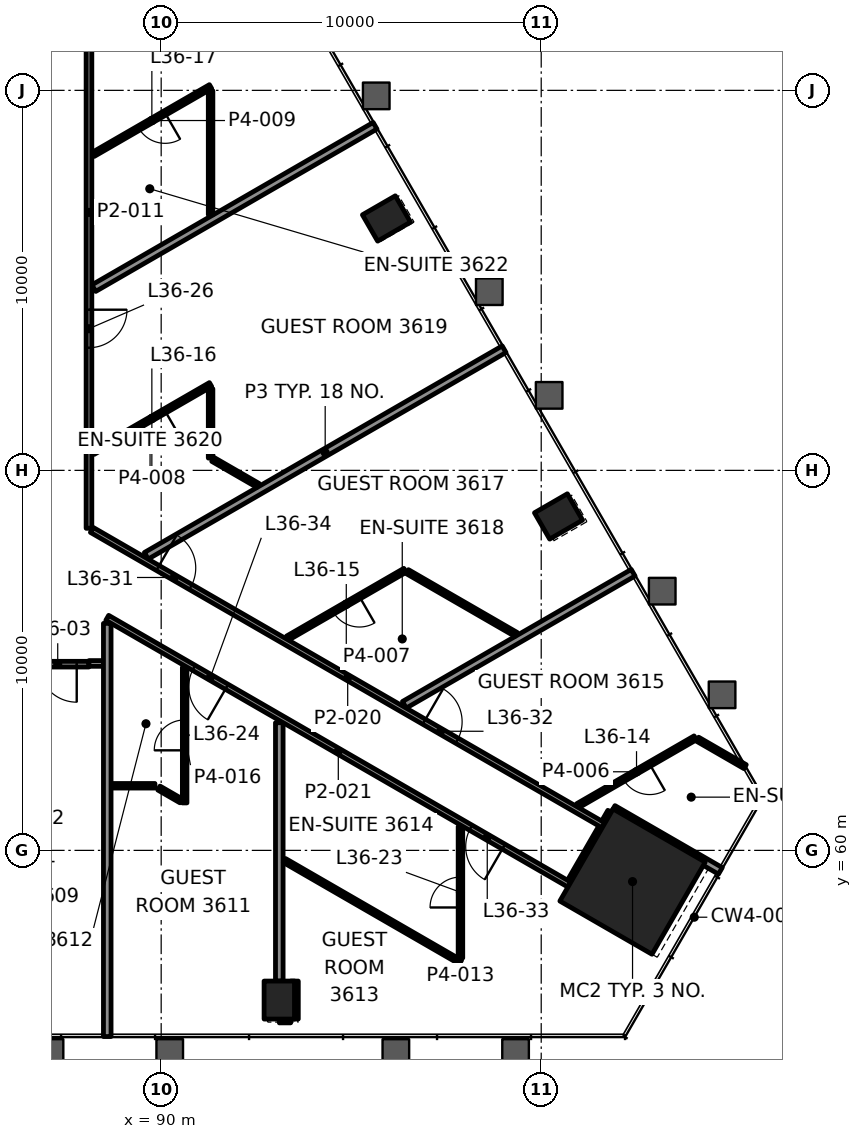
"""IFC4 building model, lengths in metres.
Left out: names, types, materials, properties, quantities, classifications, styles, units other than length and angle.
Written with IfcOpenShell. Run it as: python <this file> out.ifc"""

import sys

from ifc_helpers import new_model, si_unit, direction, frame, frame_2d, origin, origin_2d, place, context, subcontext, project, spatial, rectangle, hollow_rectangle, extrude, element, fill, save


model = new_model("IFC4")
c1 = context("Model", 3, precision=1e-05, world=origin(), true_north=direction((0.0, 1.0)))
c2 = subcontext(c1, "Body", "Model", "MODEL_VIEW")
j1 = project(units=[si_unit("LENGTHUNIT", "METRE"), si_unit("PLANEANGLEUNIT", "RADIAN")], contexts=[c1])
p1 = place(None, origin())
s1 = spatial("IfcSite", under=j1, at=p1, CompositionType="ELEMENT")
p2 = place(p1, origin())
s2 = spatial("IfcBuilding", under=s1, at=p2, CompositionType="ELEMENT")
p3 = place(p2, frame((0.0, 0.0, 159.7)))
s3 = spatial("IfcBuildingStorey", under=s2, at=p3, CompositionType="ELEMENT", Elevation=159.7)
p4 = place(p3, frame((102.403, 59.179, 0.0), z_axis=(0.0, 0.0, 1.0), x_axis=(0.5, 0.866025403784, 0.0)))
e1 = element("IfcColumn", 1, at=p4, inside=s3, PredefinedType="COLUMN", context=c2, shape_type="SweptSolid", body=[
    extrude(rectangle(XDim=2.8, YDim=2.8, at=origin_2d()), origin(), (0.0, 0.0, 1.0), 3.9),
])
for number, where, z_axis, x_axis in (
    (2, (93.108, 56.061, -0.0), (0.0, 0.0, 1.0), (1.0, 0.0, 0.0)),
    (3, (100.456, 68.788, -0.0), (0.0, 0.0, 1.0), (-0.5, 0.866, 0.0)),
    (4, (95.928, 76.628, -0.0), (0.0, 0.0, 1.0), (-0.5, 0.866, 0.0)),
):
    element("IfcColumn", number, at=place(p3, frame(where, z_axis=z_axis, x_axis=x_axis)), inside=s3, PredefinedType="COLUMN", context=c2, shape_type="SweptSolid", body=[
        extrude(hollow_rectangle(XDim=0.8, YDim=1.0, WallThickness=0.05, at=origin_2d()), origin(), (0.0, 0.0, 1.0), 3.9),
    ])
p5 = place(p3, frame((93.108, 55.561, 0.0), z_axis=(0.0, 0.0, 1.0), x_axis=(1.0, 0.0, 0.0)))
e5 = element("IfcWall", 5, at=p5, inside=s3, PredefinedType="PARTITIONING", context=c2, shape_type="SweptSolid", body=[
    extrude(rectangle(XDim=0.3, YDim=0.2, at=frame_2d((0.15, 0.0))), origin(), (0.0, 0.0, 1.0), 3.1),
])
p6 = place(p3, frame((88.691, 61.7, 0.0), z_axis=(0.0, 0.0, 1.0), x_axis=(1.0, 0.0, 0.0)))
e6 = element("IfcWall", 6, at=p6, inside=s3, PredefinedType="PARTITIONING", context=c2, shape_type="SweptSolid", body=[
    extrude(rectangle(XDim=1.145, YDim=0.12, at=frame_2d((0.573, 0.0))), origin(), (0.0, 0.0, 1.0), 3.1),
])
p7 = place(p3, frame((88.1, 64.9, 0.0), z_axis=(0.0, 0.0, 1.0), x_axis=(-1.0, 0.0, 0.0)))
e7 = element("IfcWall", 7, at=p7, inside=s3, PredefinedType="PARTITIONING", context=c2, shape_type="SweptSolid", body=[
    extrude(rectangle(XDim=26.199, YDim=0.15, at=frame_2d((13.1, 0.0))), origin(), (0.0, 0.0, 1.0), 3.1),
])
p8 = place(p7, frame((0.322, 0.0, 0.0)))
e8 = element("IfcOpeningElement", 8, at=p8, cuts=e7, PredefinedType="OPENING", context=c2, shape_type="SweptSolid", body=[
    extrude(rectangle(XDim=1.0, YDim=2.1, at=frame_2d((0.5, 1.05))), frame((0.0, 0.085, 0.0), z_axis=(0.0, -1.0, 0.0), x_axis=(1.0, 0.0, 0.0)), (0.0, 0.0, 1.0), 0.17),
])
p9 = place(p7, frame((5.859, 0.0, 0.0)))
e9 = element("IfcOpeningElement", 9, at=p9, cuts=e7, PredefinedType="OPENING", context=c2, shape_type="SweptSolid", body=[
    extrude(rectangle(XDim=0.9, YDim=2.1, at=frame_2d((0.45, 1.05))), frame((0.0, 0.085, 0.0), z_axis=(0.0, -1.0, 0.0), x_axis=(1.0, 0.0, 0.0)), (0.0, 0.0, 1.0), 0.17),
])
p10 = place(p7, frame((8.981, 0.0, 0.0)))
e10 = element("IfcOpeningElement", 10, at=p10, cuts=e7, PredefinedType="OPENING", context=c2, shape_type="SweptSolid", body=[
    extrude(rectangle(XDim=1.0, YDim=2.1, at=frame_2d((0.5, 1.05))), frame((0.0, 0.085, 0.0), z_axis=(0.0, -1.0, 0.0), x_axis=(1.0, 0.0, 0.0)), (0.0, 0.0, 1.0), 0.17),
])
p11 = place(p7, frame((16.611, 0.0, 0.0)))
e11 = element("IfcOpeningElement", 11, at=p11, cuts=e7, PredefinedType="OPENING", context=c2, shape_type="SweptSolid", body=[
    extrude(rectangle(XDim=0.9, YDim=2.1, at=frame_2d((0.45, 1.05))), frame((0.0, 0.085, 0.0), z_axis=(0.0, -1.0, 0.0), x_axis=(1.0, 0.0, 0.0)), (0.0, 0.0, 1.0), 0.17),
])
p12 = place(p7, frame((20.006, 0.0, 0.0)))
e12 = element("IfcOpeningElement", 12, at=p12, cuts=e7, PredefinedType="OPENING", context=c2, shape_type="SweptSolid", body=[
    extrude(rectangle(XDim=0.9, YDim=2.1, at=frame_2d((0.45, 1.05))), frame((0.0, 0.085, 0.0), z_axis=(0.0, -1.0, 0.0), x_axis=(1.0, 0.0, 0.0)), (0.0, 0.0, 1.0), 0.17),
])
p13 = place(p7, frame((23.575, 0.0, 0.0)))
e13 = element("IfcOpeningElement", 13, at=p13, cuts=e7, PredefinedType="OPENING", context=c2, shape_type="SweptSolid", body=[
    extrude(rectangle(XDim=1.0, YDim=2.1, at=frame_2d((0.5, 1.05))), frame((0.0, 0.085, 0.0), z_axis=(0.0, -1.0, 0.0), x_axis=(1.0, 0.0, 0.0)), (0.0, 0.0, 1.0), 0.17),
])
p14 = place(p3, frame((88.1, 64.919, 0.0), z_axis=(0.0, 0.0, 1.0), x_axis=(1.0, 0.0, 0.0)))
e14 = element("IfcWall", 14, at=p14, inside=s3, PredefinedType="PARTITIONING", context=c2, shape_type="SweptSolid", body=[
    extrude(rectangle(XDim=0.381, YDim=0.15, at=frame_2d((0.19, 0.0))), origin(), (0.0, 0.0, 1.0), 3.1),
])
p15 = place(p3, frame((104.053, 62.961, 0.0), z_axis=(0.0, 0.0, 1.0), x_axis=(-0.866045460162, -0.499965259726, 0.0)))
e15 = element("IfcWall", 15, at=p15, inside=s3, PredefinedType="PARTITIONING", context=c2, shape_type="SweptSolid", body=[
    extrude(rectangle(XDim=3.569, YDim=0.12, at=frame_2d((1.784, 0.0))), origin(), (0.0, 0.0, 1.0), 3.1),
])
p16 = place(p15, frame((1.384, 0.0, 0.0)))
e16 = element("IfcOpeningElement", 16, at=p16, cuts=e15, PredefinedType="OPENING", context=c2, shape_type="SweptSolid", body=[
    extrude(rectangle(XDim=0.8, YDim=2.1, at=frame_2d((0.4, 1.05))), frame((0.0, 0.07, 0.0), z_axis=(0.0, -1.0, 0.0), x_axis=(1.0, 0.0, 0.0)), (0.0, 0.0, 1.0), 0.14),
])
p17 = place(p3, frame((96.399, 63.831, 0.0), z_axis=(0.0, 0.0, 1.0), x_axis=(0.86602358327, 0.50000315321, 0.0)))
e17 = element("IfcWall", 17, at=p17, inside=s3, PredefinedType="PARTITIONING", context=c2, shape_type="SweptSolid", body=[
    extrude(rectangle(XDim=6.952, YDim=0.2, at=frame_2d((3.476, 0.0))), origin(), (0.0, 0.0, 1.0), 3.1),
])
p18 = place(p3, frame((96.416, 67.37, 0.0), z_axis=(0.0, 0.0, 1.0), x_axis=(-0.866028357664, -0.499994883695, 0.0)))
e18 = element("IfcWall", 18, at=p18, inside=s3, PredefinedType="PARTITIONING", context=c2, shape_type="SweptSolid", body=[
    extrude(rectangle(XDim=3.568, YDim=0.12, at=frame_2d((1.784, 0.0))), origin(), (0.0, 0.0, 1.0), 3.1),
])
p19 = place(p18, frame((1.384, 0.0, 0.0)))
e19 = element("IfcOpeningElement", 19, at=p19, cuts=e18, PredefinedType="OPENING", context=c2, shape_type="SweptSolid", body=[
    extrude(rectangle(XDim=0.8, YDim=2.1, at=frame_2d((0.4, 1.05))), frame((0.0, 0.07, 0.0), z_axis=(0.0, -1.0, 0.0), x_axis=(1.0, 0.0, 0.0)), (0.0, 0.0, 1.0), 0.14),
])
p20 = place(p3, frame((89.608, 67.752, 0.0), z_axis=(0.0, 0.0, 1.0), x_axis=(0.86602628359, 0.499998476129, 0.0)))
e20 = element("IfcWall", 20, at=p20, inside=s3, PredefinedType="PARTITIONING", context=c2, shape_type="SweptSolid", body=[
    extrude(rectangle(XDim=10.872, YDim=0.2, at=frame_2d((5.436, 0.0))), origin(), (0.0, 0.0, 1.0), 2.865),
])
p21 = place(p3, frame((91.3, 72.258, 0.0), z_axis=(0.0, 0.0, 1.0), x_axis=(-0.866028357664, -0.499994883695, 0.0)))
e21 = element("IfcWall", 21, at=p21, inside=s3, PredefinedType="PARTITIONING", context=c2, shape_type="SweptSolid", body=[
    extrude(rectangle(XDim=3.568, YDim=0.12, at=frame_2d((1.784, 0.0))), origin(), (0.0, 0.0, 1.0), 3.1),
])
p22 = place(p21, frame((1.384, 0.0, 0.0)))
e22 = element("IfcOpeningElement", 22, at=p22, cuts=e21, PredefinedType="OPENING", context=c2, shape_type="SweptSolid", body=[
    extrude(rectangle(XDim=0.8, YDim=2.1, at=frame_2d((0.4, 1.05))), frame((0.0, 0.07, 0.0), z_axis=(0.0, -1.0, 0.0), x_axis=(1.0, 0.0, 0.0)), (0.0, 0.0, 1.0), 0.14),
])
p23 = place(p3, frame((88.227, 74.795, 0.0), z_axis=(0.0, 0.0, 1.0), x_axis=(0.866017652766, 0.500013424917, 0.0)))
e23 = element("IfcWall", 23, at=p23, inside=s3, PredefinedType="PARTITIONING", context=c2, shape_type="SweptSolid", body=[
    extrude(rectangle(XDim=8.546, YDim=0.2, at=frame_2d((4.273, 0.0))), origin(), (0.0, 0.0, 1.0), 2.865),
])
p24 = place(p3, frame((91.3, 80.098, 0.0), z_axis=(0.0, 0.0, 1.0), x_axis=(-0.866028357664, -0.499994883695, 0.0)))
e24 = element("IfcWall", 24, at=p24, inside=s3, PredefinedType="PARTITIONING", context=c2, shape_type="SweptSolid", body=[
    extrude(rectangle(XDim=3.568, YDim=0.12, at=frame_2d((1.784, 0.0))), origin(), (0.0, 0.0, 1.0), 3.1),
])
p25 = place(p24, frame((1.384, 0.0, 0.0)))
e25 = element("IfcOpeningElement", 25, at=p25, cuts=e24, PredefinedType="OPENING", context=c2, shape_type="SweptSolid", body=[
    extrude(rectangle(XDim=0.8, YDim=2.1, at=frame_2d((0.4, 1.05))), frame((0.0, 0.07, 0.0), z_axis=(0.0, -1.0, 0.0), x_axis=(1.0, 0.0, 0.0)), (0.0, 0.0, 1.0), 0.14),
])
p26 = place(p3, frame((100.778, 59.165, 0.0), z_axis=(0.0, 0.0, 1.0), x_axis=(0.500102515474, 0.865966208357, 0.0)))
e26 = element("IfcWall", 26, at=p26, inside=s3, PredefinedType="PARTITIONING", context=c2, shape_type="SweptSolid", body=[
    extrude(rectangle(XDim=1.65, YDim=0.2, at=frame_2d((0.825, 0.0))), origin(), (0.0, 0.0, 1.0), 2.947),
])
p27 = place(p3, frame((97.875, 57.168, 0.0), z_axis=(0.0, 0.0, 1.0), x_axis=(0.0, 1.0, 0.0)))
e27 = element("IfcWall", 27, at=p27, inside=s3, PredefinedType="PARTITIONING", context=c2, shape_type="SweptSolid", body=[
    extrude(rectangle(XDim=3.459, YDim=0.12, at=frame_2d((1.729, 0.0))), origin(), (0.0, 0.0, 1.0), 3.1),
])
p28 = place(p27, frame((1.33, 0.0, 0.0)))
e28 = element("IfcOpeningElement", 28, at=p28, cuts=e27, PredefinedType="OPENING", context=c2, shape_type="SweptSolid", body=[
    extrude(rectangle(XDim=0.8, YDim=2.1, at=frame_2d((0.4, 1.05))), frame((0.0, 0.07, 0.0), z_axis=(0.0, -1.0, 0.0), x_axis=(1.0, 0.0, 0.0)), (0.0, 0.0, 1.0), 0.14),
])
p29 = place(p3, frame((93.508, 55.562, 0.0), z_axis=(0.0, 0.0, 1.0), x_axis=(0.0, 1.0, 0.0)))
e29 = element("IfcWall", 29, at=p29, inside=s3, PredefinedType="PARTITIONING", context=c2, shape_type="SweptSolid", body=[
    extrude(rectangle(XDim=0.999, YDim=0.2, at=frame_2d((0.5, 0.0))), origin(), (0.0, 0.0, 1.0), 3.1),
])
p30 = place(p3, frame((93.108, 56.561, 0.0), z_axis=(0.0, 0.0, 1.0), x_axis=(0.0, 1.0, 0.0)))
e30 = element("IfcWall", 30, at=p30, inside=s3, PredefinedType="PARTITIONING", context=c2, shape_type="SweptSolid", body=[
    extrude(rectangle(XDim=6.799, YDim=0.2, at=frame_2d((3.399, 0.0))), origin(), (0.0, 0.0, 1.0), 3.1),
])
p31 = place(p3, frame((91.3, 70.323, 0.0), z_axis=(0.0, 0.0, 1.0), x_axis=(0.0, 1.0, 0.0)))
e31 = element("IfcWall", 31, at=p31, inside=s3, PredefinedType="PARTITIONING", context=c2, shape_type="SweptSolid", body=[
    extrude(rectangle(XDim=1.824, YDim=0.12, at=frame_2d((0.912, 0.0))), origin(), (0.0, 0.0, 1.0), 3.1),
])
p32 = place(p3, frame((91.3, 76.725, 0.0), z_axis=(0.0, 0.0, 1.0), x_axis=(0.0, 1.0, 0.0)))
e32 = element("IfcWall", 32, at=p32, inside=s3, PredefinedType="PARTITIONING", context=c2, shape_type="SweptSolid", body=[
    extrude(rectangle(XDim=3.264, YDim=0.12, at=frame_2d((1.632, 0.0))), origin(), (0.0, 0.0, 1.0), 3.1),
])
p33 = place(p3, frame((90.618, 61.249, 0.0), z_axis=(0.0, 0.0, 1.0), x_axis=(0.0, 1.0, 0.0)))
e33 = element("IfcWall", 33, at=p33, inside=s3, PredefinedType="PARTITIONING", context=c2, shape_type="SweptSolid", body=[
    extrude(rectangle(XDim=3.569, YDim=0.12, at=frame_2d((1.784, 0.0))), origin(), (0.0, 0.0, 1.0), 2.947),
])
p34 = place(p33, frame((1.384, 0.0, 0.0)))
e34 = element("IfcOpeningElement", 34, at=p34, cuts=e33, PredefinedType="OPENING", context=c2, shape_type="SweptSolid", body=[
    extrude(rectangle(XDim=0.8, YDim=2.1, at=frame_2d((0.4, 1.05))), frame((0.0, 0.07, 0.0), z_axis=(0.0, -1.0, 0.0), x_axis=(1.0, 0.0, 0.0)), (0.0, 0.0, 1.0), 0.14),
])
p35 = place(p3, frame((88.581, 55.101, 0.0), z_axis=(0.0, 0.0, 1.0), x_axis=(0.0, 1.0, 0.0)))
e35 = element("IfcWall", 35, at=p35, inside=s3, PredefinedType="PARTITIONING", context=c2, shape_type="SweptSolid", body=[
    extrude(rectangle(XDim=10.872, YDim=0.2, at=frame_2d((5.436, 0.0))), origin(), (0.0, 0.0, 1.0), 2.865),
])
p36 = place(p3, frame((88.1, 85.1, 0.0), z_axis=(0.0, 0.0, 1.0), x_axis=(0.0, -1.0, 0.0)))
e36 = element("IfcWall", 36, at=p36, inside=s3, PredefinedType="PARTITIONING", context=c2, shape_type="SweptSolid", body=[
    extrude(rectangle(XDim=16.624, YDim=0.15, at=frame_2d((8.312, 0.0))), origin(), (0.0, 0.0, 1.0), 3.1),
])
p37 = place(p36, frame((3.031, 0.0, 0.0)))
e37 = element("IfcOpeningElement", 37, at=p37, cuts=e36, PredefinedType="OPENING", context=c2, shape_type="SweptSolid", body=[
    extrude(rectangle(XDim=1.0, YDim=2.1, at=frame_2d((0.5, 1.05))), frame((0.0, 0.085, 0.0), z_axis=(0.0, -1.0, 0.0), x_axis=(1.0, 0.0, 0.0)), (0.0, 0.0, 1.0), 0.17),
])
p38 = place(p36, frame((10.872, 0.0, 0.0)))
e38 = element("IfcOpeningElement", 38, at=p38, cuts=e36, PredefinedType="OPENING", context=c2, shape_type="SweptSolid", body=[
    extrude(rectangle(XDim=1.0, YDim=2.1, at=frame_2d((0.5, 1.05))), frame((0.0, 0.085, 0.0), z_axis=(0.0, -1.0, 0.0), x_axis=(1.0, 0.0, 0.0)), (0.0, 0.0, 1.0), 0.17),
])
p39 = place(p3, frame((105.366, 62.203, 0.0), z_axis=(0.0, 0.0, 1.0), x_axis=(-0.866011286779, 0.500024450573, 0.0)))
e39 = element("IfcWall", 39, at=p39, inside=s3, PredefinedType="PARTITIONING", context=c2, shape_type="SweptSolid", body=[
    extrude(rectangle(XDim=1.446, YDim=0.12, at=frame_2d((0.723, 0.0))), origin(), (0.0, 0.0, 1.0), 3.1),
])
p40 = place(p3, frame((99.337, 65.684, 0.0), z_axis=(0.0, 0.0, 1.0), x_axis=(-0.866024373554, 0.500001784407, 0.0)))
e40 = element("IfcWall", 40, at=p40, inside=s3, PredefinedType="PARTITIONING", context=c2, shape_type="SweptSolid", body=[
    extrude(rectangle(XDim=3.304, YDim=0.12, at=frame_2d((1.652, 0.0))), origin(), (0.0, 0.0, 1.0), 3.1),
])
p41 = place(p3, frame((92.546, 69.604, 0.0), z_axis=(0.0, 0.0, 1.0), x_axis=(-0.866052025982, 0.499953886166, 0.0)))
e41 = element("IfcWall", 41, at=p41, inside=s3, PredefinedType="PARTITIONING", context=c2, shape_type="SweptSolid", body=[
    extrude(rectangle(XDim=1.37, YDim=0.12, at=frame_2d((0.685, 0.0))), origin(), (0.0, 0.0, 1.0), 3.1),
])
p42 = place(p3, frame((104.714, 59.461, 0.0), z_axis=(0.0, 0.0, 1.0), x_axis=(-0.866035906198, 0.499981808845, 0.0)))
e42 = element("IfcWall", 42, at=p42, inside=s3, PredefinedType="PARTITIONING", context=c2, shape_type="SweptSolid", body=[
    extrude(rectangle(XDim=3.259, YDim=0.2, at=frame_2d((1.63, 0.0))), origin(), (0.0, 0.0, 1.0), 3.1),
])
p43 = place(p3, frame((88.175, 68.433, 0.0), z_axis=(0.0, 0.0, 1.0), x_axis=(0.866030530892, -0.499991119485, 0.0)))
e43 = element("IfcWall", 43, at=p43, inside=s3, PredefinedType="PARTITIONING", context=c2, shape_type="SweptSolid", body=[
    extrude(rectangle(XDim=15.549, YDim=0.15, at=frame_2d((7.774, 0.0))), origin(), (0.0, 0.0, 1.0), 3.1),
])
p44 = place(p43, frame((2.003, 0.0, 0.0)))
e44 = element("IfcOpeningElement", 44, at=p44, cuts=e43, PredefinedType="OPENING", context=c2, shape_type="SweptSolid", body=[
    extrude(rectangle(XDim=1.0, YDim=2.1, at=frame_2d((0.5, 1.05))), frame((0.0, 0.085, 0.0), z_axis=(0.0, -1.0, 0.0), x_axis=(1.0, 0.0, 0.0)), (0.0, 0.0, 1.0), 0.17),
])
p45 = place(p43, frame((10.096, 0.0, 0.0)))
e45 = element("IfcOpeningElement", 45, at=p45, cuts=e43, PredefinedType="OPENING", context=c2, shape_type="SweptSolid", body=[
    extrude(rectangle(XDim=1.0, YDim=2.1, at=frame_2d((0.5, 1.05))), frame((0.0, 0.085, 0.0), z_axis=(0.0, -1.0, 0.0), x_axis=(1.0, 0.0, 0.0)), (0.0, 0.0, 1.0), 0.17),
])
p46 = place(p3, frame((100.74, 59.1, 0.0), z_axis=(0.0, 0.0, 1.0), x_axis=(-0.866028060244, 0.499995398849, 0.0)))
e46 = element("IfcWall", 46, at=p46, inside=s3, PredefinedType="PARTITIONING", context=c2, shape_type="SweptSolid", body=[
    extrude(rectangle(XDim=14.04, YDim=0.15, at=frame_2d((7.02, 0.0))), origin(), (0.0, 0.0, 1.0), 2.947),
])
p47 = place(p46, frame((1.994, 0.0, 0.0)))
e47 = element("IfcOpeningElement", 47, at=p47, cuts=e46, PredefinedType="OPENING", context=c2, shape_type="SweptSolid", body=[
    extrude(rectangle(XDim=1.0, YDim=2.1, at=frame_2d((0.5, 1.05))), frame((0.0, 0.085, 0.0), z_axis=(0.0, -1.0, 0.0), x_axis=(1.0, 0.0, 0.0)), (0.0, 0.0, 1.0), 0.17),
])
p48 = place(p46, frame((10.409, 0.0, 0.0)))
e48 = element("IfcOpeningElement", 48, at=p48, cuts=e46, PredefinedType="OPENING", context=c2, shape_type="SweptSolid", body=[
    extrude(rectangle(XDim=1.0, YDim=2.1, at=frame_2d((0.5, 1.05))), frame((0.0, 0.085, 0.0), z_axis=(0.0, -1.0, 0.0), x_axis=(1.0, 0.0, 0.0)), (0.0, 0.0, 1.0), 0.17),
])
p49 = place(p3, frame((97.875, 57.059, 0.0), z_axis=(0.0, 0.0, 1.0), x_axis=(-0.866041187555, 0.499972660711, 0.0)))
e49 = element("IfcWall", 49, at=p49, inside=s3, PredefinedType="PARTITIONING", context=c2, shape_type="SweptSolid", body=[
    extrude(rectangle(XDim=5.349, YDim=0.12, at=frame_2d((2.675, 0.0))), origin(), (0.0, 0.0, 1.0), 3.1),
])
p50 = place(p3, frame((90.523, 61.303, 0.0), z_axis=(0.0, 0.0, 1.0), x_axis=(-0.865913915833, 0.500193053097, 0.0)))
e50 = element("IfcWall", 50, at=p50, inside=s3, PredefinedType="PARTITIONING", context=c2, shape_type="SweptSolid", body=[
    extrude(rectangle(XDim=0.674, YDim=0.12, at=frame_2d((0.337, 0.0))), origin(), (0.0, 0.0, 1.0), 3.1),
])
p51 = place(p3, frame((101.678, 60.723, 0.0), z_axis=(0.0, 0.0, 1.0), x_axis=(0.499700736801, 0.866198114545, 0.0)))
e51 = element("IfcWall", 51, at=p51, inside=s3, PredefinedType="PARTITIONING", context=c2, shape_type="SweptSolid", body=[
    extrude(rectangle(XDim=0.324, YDim=0.2, at=frame_2d((0.162, 0.0))), origin(), (0.0, 0.0, 1.0), 3.1),
])
p52 = place(p8, origin())
e52 = element("IfcDoor", 52, at=p52, inside=s3, OperationType="SINGLE_SWING_LEFT", PredefinedType="DOOR", context=c2, shape_type="SweptSolid", body=[
    extrude(rectangle(XDim=1.0, YDim=2.1, at=frame_2d((0.5, 1.05))), frame((0.0, 0.025, 0.0), z_axis=(0.0, -1.0, 0.0), x_axis=(1.0, 0.0, 0.0)), (0.0, 0.0, 1.0), 0.05),
])
fill(e8, e52)
p53 = place(p16, origin())
e53 = element("IfcDoor", 53, at=p53, inside=s3, OperationType="SINGLE_SWING_RIGHT", PredefinedType="DOOR", context=c2, shape_type="SweptSolid", body=[
    extrude(rectangle(XDim=0.8, YDim=2.1, at=frame_2d((0.4, 1.05))), frame((0.0, 0.025, 0.0), z_axis=(0.0, -1.0, 0.0), x_axis=(1.0, 0.0, 0.0)), (0.0, 0.0, 1.0), 0.05),
])
fill(e16, e53)
p54 = place(p19, origin())
e54 = element("IfcDoor", 54, at=p54, inside=s3, OperationType="SINGLE_SWING_RIGHT", PredefinedType="DOOR", context=c2, shape_type="SweptSolid", body=[
    extrude(rectangle(XDim=0.8, YDim=2.1, at=frame_2d((0.4, 1.05))), frame((0.0, 0.025, 0.0), z_axis=(0.0, -1.0, 0.0), x_axis=(1.0, 0.0, 0.0)), (0.0, 0.0, 1.0), 0.05),
])
fill(e19, e54)
p55 = place(p22, origin())
e55 = element("IfcDoor", 55, at=p55, inside=s3, OperationType="SINGLE_SWING_RIGHT", PredefinedType="DOOR", context=c2, shape_type="SweptSolid", body=[
    extrude(rectangle(XDim=0.8, YDim=2.1, at=frame_2d((0.4, 1.05))), frame((0.0, 0.025, 0.0), z_axis=(0.0, -1.0, 0.0), x_axis=(1.0, 0.0, 0.0)), (0.0, 0.0, 1.0), 0.05),
])
fill(e22, e55)
p56 = place(p25, origin())
e56 = element("IfcDoor", 56, at=p56, inside=s3, OperationType="SINGLE_SWING_RIGHT", PredefinedType="DOOR", context=c2, shape_type="SweptSolid", body=[
    extrude(rectangle(XDim=0.8, YDim=2.1, at=frame_2d((0.4, 1.05))), frame((0.0, 0.025, 0.0), z_axis=(0.0, -1.0, 0.0), x_axis=(1.0, 0.0, 0.0)), (0.0, 0.0, 1.0), 0.05),
])
fill(e25, e56)
p57 = place(p28, origin())
e57 = element("IfcDoor", 57, at=p57, inside=s3, OperationType="SINGLE_SWING_LEFT", PredefinedType="DOOR", context=c2, shape_type="SweptSolid", body=[
    extrude(rectangle(XDim=0.8, YDim=2.1, at=frame_2d((0.4, 1.05))), frame((0.0, 0.025, 0.0), z_axis=(0.0, -1.0, 0.0), x_axis=(1.0, 0.0, 0.0)), (0.0, 0.0, 1.0), 0.05),
])
fill(e28, e57)
p58 = place(p34, origin())
e58 = element("IfcDoor", 58, at=p58, inside=s3, OperationType="SINGLE_SWING_LEFT", PredefinedType="DOOR", context=c2, shape_type="SweptSolid", body=[
    extrude(rectangle(XDim=0.8, YDim=2.1, at=frame_2d((0.4, 1.05))), frame((0.0, 0.025, 0.0), z_axis=(0.0, -1.0, 0.0), x_axis=(1.0, 0.0, 0.0)), (0.0, 0.0, 1.0), 0.05),
])
fill(e34, e58)
p59 = place(p38, origin())
e59 = element("IfcDoor", 59, at=p59, inside=s3, OperationType="SINGLE_SWING_LEFT", PredefinedType="DOOR", context=c2, shape_type="SweptSolid", body=[
    extrude(rectangle(XDim=1.0, YDim=2.1, at=frame_2d((0.5, 1.05))), frame((0.0, 0.025, 0.0), z_axis=(0.0, -1.0, 0.0), x_axis=(1.0, 0.0, 0.0)), (0.0, 0.0, 1.0), 0.05),
])
fill(e38, e59)
p60 = place(p44, origin())
e60 = element("IfcDoor", 60, at=p60, inside=s3, OperationType="SINGLE_SWING_LEFT", PredefinedType="DOOR", context=c2, shape_type="SweptSolid", body=[
    extrude(rectangle(XDim=1.0, YDim=2.1, at=frame_2d((0.5, 1.05))), frame((0.0, 0.025, 0.0), z_axis=(0.0, -1.0, 0.0), x_axis=(1.0, 0.0, 0.0)), (0.0, 0.0, 1.0), 0.05),
])
fill(e44, e60)
p61 = place(p45, origin())
e61 = element("IfcDoor", 61, at=p61, inside=s3, OperationType="SINGLE_SWING_LEFT", PredefinedType="DOOR", context=c2, shape_type="SweptSolid", body=[
    extrude(rectangle(XDim=1.0, YDim=2.1, at=frame_2d((0.5, 1.05))), frame((0.0, 0.025, 0.0), z_axis=(0.0, -1.0, 0.0), x_axis=(1.0, 0.0, 0.0)), (0.0, 0.0, 1.0), 0.05),
])
fill(e45, e61)
p62 = place(p47, origin())
e62 = element("IfcDoor", 62, at=p62, inside=s3, OperationType="SINGLE_SWING_RIGHT", PredefinedType="DOOR", context=c2, shape_type="SweptSolid", body=[
    extrude(rectangle(XDim=1.0, YDim=2.1, at=frame_2d((0.5, 1.05))), frame((0.0, 0.025, 0.0), z_axis=(0.0, -1.0, 0.0), x_axis=(1.0, 0.0, 0.0)), (0.0, 0.0, 1.0), 0.05),
])
fill(e47, e62)
p63 = place(p48, origin())
e63 = element("IfcDoor", 63, at=p63, inside=s3, OperationType="SINGLE_SWING_RIGHT", PredefinedType="DOOR", context=c2, shape_type="SweptSolid", body=[
    extrude(rectangle(XDim=1.0, YDim=2.1, at=frame_2d((0.5, 1.05))), frame((0.0, 0.025, 0.0), z_axis=(0.0, -1.0, 0.0), x_axis=(1.0, 0.0, 0.0)), (0.0, 0.0, 1.0), 0.05),
])
fill(e48, e63)
save(model, sys.argv[1])
